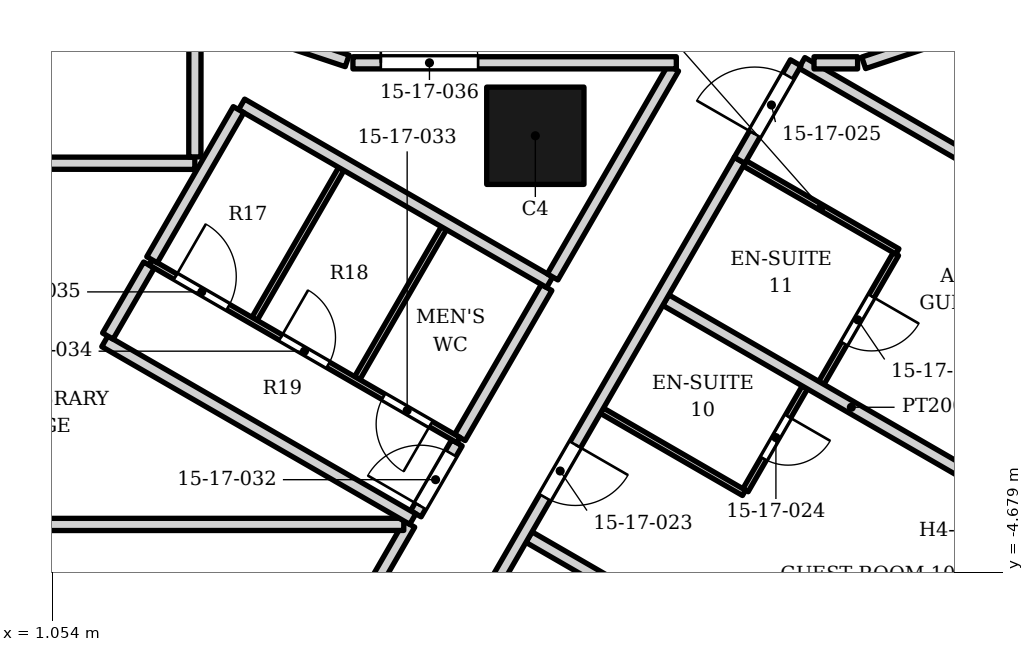
"""IFC4 building model, lengths in metres.
Left out: names, types, materials, properties, quantities, classifications, styles, units other than length and angle.
Written with IfcOpenShell. Run it as: python <this file> out.ifc"""

import sys

from ifc_helpers import new_model, si_unit, direction, frame, frame_2d, origin, origin_2d, place, context, subcontext, project, spatial, rectangle, extrude, element, fill, save


model = new_model("IFC4")
c1 = context("Model", 3, precision=1e-05, world=origin(), true_north=direction((0.0, 1.0)))
c2 = subcontext(c1, "Body", "Model", "MODEL_VIEW")
j1 = project(units=[si_unit("LENGTHUNIT", "METRE"), si_unit("PLANEANGLEUNIT", "RADIAN")], contexts=[c1])
p1 = place(None, origin())
s1 = spatial("IfcSite", under=j1, at=p1, CompositionType="ELEMENT")
p2 = place(p1, origin())
s2 = spatial("IfcBuilding", under=s1, at=p2, CompositionType="ELEMENT")
p3 = place(p2, frame((0.0, 0.0, 76.6)))
s3 = spatial("IfcBuildingStorey", under=s2, at=p3, CompositionType="ELEMENT", Elevation=76.6)
p4 = place(p3, frame((9.0, 2.5, 0.0), z_axis=(0.0, 0.0, 1.0), x_axis=(1.0, 0.0, 0.0)))
e1 = element("IfcColumn", 1, at=p4, inside=s3, PredefinedType="COLUMN", context=c2, shape_type="SweptSolid", body=[
    extrude(rectangle(XDim=1.6, YDim=1.6, at=origin_2d()), origin(), (0.0, 0.0, 1.0), 3.4),
])
p5 = place(p3, frame((15.464, -7.721, 0.0), z_axis=(0.0, 0.0, 1.0), x_axis=(0.500027713859, 0.866009402589, 0.0)))
e2 = element("IfcWall", 2, at=p5, inside=s3, PredefinedType="ELEMENTEDWALL", context=c2, shape_type="SweptSolid", body=[
    extrude(rectangle(XDim=4.2, YDim=0.2, at=frame_2d((2.1, 0.0))), origin(), (0.0, 0.0, 1.0), 2.384),
])
p6 = place(p5, frame((0.3, 0.0, 0.6)))
e3 = element("IfcOpeningElement", 3, at=p6, cuts=e2, PredefinedType="OPENING", context=c2, shape_type="SweptSolid", body=[
    extrude(rectangle(XDim=2.1, YDim=1.68, at=frame_2d((1.05, 0.84))), frame((0.0, 0.11, 0.0), z_axis=(0.0, -1.0, 0.0), x_axis=(1.0, 0.0, 0.0)), (0.0, 0.0, 1.0), 0.22),
])
p7 = place(p5, frame((2.7, 0.0, 0.0)))
e4 = element("IfcOpeningElement", 4, at=p7, cuts=e2, PredefinedType="OPENING", context=c2, shape_type="SweptSolid", body=[
    extrude(rectangle(XDim=1.2, YDim=2.28, at=frame_2d((0.6, 1.14))), frame((0.0, 0.11, 0.0), z_axis=(0.0, -1.0, 0.0), x_axis=(1.0, 0.0, 0.0)), (0.0, 0.0, 1.0), 0.22),
])
p8 = place(p3, frame((-0.029, -15.955, 0.0), z_axis=(0.0, 0.0, 1.0), x_axis=(0.499541892375, 0.866289730842, 0.0)))
e5 = element("IfcWall", 5, at=p8, inside=s3, PredefinedType="PARTITIONING", context=c2, shape_type="SweptSolid", body=[
    extrude(rectangle(XDim=13.93, YDim=0.2, at=frame_2d((6.965, 0.0))), origin(), (0.0, 0.0, 1.0), 2.242),
])
p9 = place(p8, frame((1.27, 0.0, 0.0)))
e6 = element("IfcOpeningElement", 6, at=p9, cuts=e5, PredefinedType="OPENING", context=c2, shape_type="SweptSolid", body=[
    extrude(rectangle(XDim=0.9, YDim=2.1, at=frame_2d((0.45, 1.05))), frame((0.0, 0.11, 0.0), z_axis=(0.0, -1.0, 0.0), x_axis=(1.0, 0.0, 0.0)), (0.0, 0.0, 1.0), 0.22),
])
p10 = place(p8, frame((8.235, 0.0, 0.0)))
e7 = element("IfcOpeningElement", 7, at=p10, cuts=e5, PredefinedType="OPENING", context=c2, shape_type="SweptSolid", body=[
    extrude(rectangle(XDim=0.9, YDim=2.1, at=frame_2d((0.45, 1.05))), frame((0.0, 0.11, 0.0), z_axis=(0.0, -1.0, 0.0), x_axis=(1.0, 0.0, 0.0)), (0.0, 0.0, 1.0), 0.22),
])
p11 = place(p3, frame((8.895, -4.1, 0.0), z_axis=(0.0, 0.0, 1.0), x_axis=(0.865906406618, -0.500206052519, 0.0)))
e8 = element("IfcWall", 8, at=p11, inside=s3, PredefinedType="PARTITIONING", context=c2, shape_type="SweptSolid", body=[
    extrude(rectangle(XDim=7.05, YDim=0.2, at=frame_2d((3.525, 0.0))), origin(), (0.0, 0.0, 1.0), 2.242),
])
p12 = place(p3, frame((-1.162, -3.893, 0.0), z_axis=(0.0, 0.0, 1.0), x_axis=(0.999999970181, 0.000244207691, 0.0)))
e9 = element("IfcWall", 9, at=p12, inside=s3, PredefinedType="PARTITIONING", context=c2, shape_type="SweptSolid", body=[
    extrude(rectangle(XDim=7.998, YDim=0.2, at=frame_2d((3.999, 0.0))), origin(), (0.0, 0.0, 1.0), 3.23),
])
p13 = place(p3, frame((7.035, -3.717, 0.0), z_axis=(0.0, 0.0, 1.0), x_axis=(0.50106482324, 0.865409754342, 0.0)))
e10 = element("IfcWall", 10, at=p13, inside=s3, PredefinedType="PARTITIONING", context=c2, shape_type="SweptSolid", body=[
    extrude(rectangle(XDim=1.348, YDim=0.2, at=frame_2d((0.674, 0.0))), origin(), (0.0, 0.0, 1.0), 2.242),
])
p14 = place(p13, frame((0.148, 0.0, 0.0)))
e11 = element("IfcOpeningElement", 11, at=p14, cuts=e10, PredefinedType="OPENING", context=c2, shape_type="SweptSolid", body=[
    extrude(rectangle(XDim=1.0, YDim=2.1, at=frame_2d((0.5, 1.05))), frame((0.0, 0.11, 0.0), z_axis=(0.0, -1.0, 0.0), x_axis=(1.0, 0.0, 0.0)), (0.0, 0.0, 1.0), 0.22),
])
p15 = place(p3, frame((12.457, -3.33, 0.0), z_axis=(0.0, 0.0, 1.0), x_axis=(0.49989585183, 0.866085525409, 0.0)))
e12 = element("IfcWall", 12, at=p15, inside=s3, PredefinedType="PARTITIONING", context=c2, shape_type="SweptSolid", body=[
    extrude(rectangle(XDim=1.95, YDim=0.1, at=frame_2d((0.975, 0.0))), origin(), (0.0, 0.0, 1.0), 2.242),
])
p16 = place(p15, frame((0.6, 0.0, 0.0)))
e13 = element("IfcOpeningElement", 13, at=p16, cuts=e12, PredefinedType="OPENING", context=c2, shape_type="SweptSolid", body=[
    extrude(rectangle(XDim=0.8, YDim=2.1, at=frame_2d((0.4, 1.05))), frame((0.0, 0.06, 0.0), z_axis=(0.0, -1.0, 0.0), x_axis=(1.0, 0.0, 0.0)), (0.0, 0.0, 1.0), 0.12),
])
p17 = place(p3, frame((7.759, -2.462, 0.0), z_axis=(0.0, 0.0, 1.0), x_axis=(0.500533044877, 0.865717431375, 0.0)))
e14 = element("IfcWall", 14, at=p17, inside=s3, PredefinedType="PARTITIONING", context=c2, shape_type="SweptSolid", body=[
    extrude(rectangle(XDim=2.85, YDim=0.2, at=frame_2d((1.425, 0.0))), origin(), (0.0, 0.0, 1.0), 2.473),
])
p18 = place(p3, frame((10.094, -2.021, 0.0), z_axis=(0.0, 0.0, 1.0), x_axis=(0.86571095196, -0.500544251447, 0.0)))
e15 = element("IfcWall", 15, at=p18, inside=s3, PredefinedType="PARTITIONING", context=c2, shape_type="SweptSolid", body=[
    extrude(rectangle(XDim=2.7, YDim=0.1, at=frame_2d((1.35, 0.0))), origin(), (0.0, 0.0, 1.0), 2.242),
])
p19 = place(p3, frame((13.704, -1.566, 0.0), z_axis=(0.0, 0.0, 1.0), x_axis=(0.500607988505, 0.865674096785, 0.0)))
e16 = element("IfcWall", 16, at=p19, inside=s3, PredefinedType="PARTITIONING", context=c2, shape_type="SweptSolid", body=[
    extrude(rectangle(XDim=2.45, YDim=0.1, at=frame_2d((1.225, 0.0))), origin(), (0.0, 0.0, 1.0), 2.242),
])
p20 = place(p19, frame((0.75, 0.0, 0.0)))
e17 = element("IfcOpeningElement", 17, at=p20, cuts=e16, PredefinedType="OPENING", context=c2, shape_type="SweptSolid", body=[
    extrude(rectangle(XDim=0.9, YDim=2.1, at=frame_2d((0.45, 1.05))), frame((0.0, 0.06, 0.0), z_axis=(0.0, -1.0, 0.0), x_axis=(1.0, 0.0, 0.0)), (0.0, 0.0, 1.0), 0.12),
])
p21 = place(p3, frame((6.071, -1.486, 0.0), z_axis=(0.0, 0.0, 1.0), x_axis=(0.500536077286, 0.865715678115, 0.0)))
e18 = element("IfcWall", 18, at=p21, inside=s3, PredefinedType="PARTITIONING", context=c2, shape_type="SweptSolid", body=[
    extrude(rectangle(XDim=2.848, YDim=0.1, at=frame_2d((1.424, 0.0))), origin(), (0.0, 0.0, 1.0), 2.242),
])
p22 = place(p3, frame((1.919, -0.881, 0.0), z_axis=(0.0, 0.0, 1.0), x_axis=(0.866167515178, -0.499753775024, 0.0)))
e19 = element("IfcWall", 19, at=p22, inside=s3, PredefinedType="PARTITIONING", context=c2, shape_type="SweptSolid", body=[
    extrude(rectangle(XDim=5.848, YDim=0.2, at=frame_2d((2.924, 0.0))), origin(), (0.0, 0.0, 1.0), 2.242),
])
p23 = place(p3, frame((4.382, -0.511, 0.0), z_axis=(0.0, 0.0, 1.0), x_axis=(0.500536077286, 0.865715678115, 0.0)))
e20 = element("IfcWall", 20, at=p23, inside=s3, PredefinedType="PARTITIONING", context=c2, shape_type="SweptSolid", body=[
    extrude(rectangle(XDim=2.848, YDim=0.1, at=frame_2d((1.424, 0.0))), origin(), (0.0, 0.0, 1.0), 2.242),
])
p24 = place(p3, frame((11.145, -0.202, 0.0), z_axis=(0.0, 0.0, 1.0), x_axis=(0.866031034943, -0.499990246421, 0.0)))
e21 = element("IfcWall", 21, at=p24, inside=s3, PredefinedType="PARTITIONING", context=c2, shape_type="SweptSolid", body=[
    extrude(rectangle(XDim=7.05, YDim=0.2, at=frame_2d((3.525, 0.0))), origin(), (0.0, 0.0, 1.0), 2.242),
])
p25 = place(p3, frame((4.169, 3.016, 0.0), z_axis=(0.0, 0.0, 1.0), x_axis=(0.866018092707, -0.500012662943, 0.0)))
e22 = element("IfcWall", 22, at=p25, inside=s3, PredefinedType="PARTITIONING", context=c2, shape_type="SweptSolid", body=[
    extrude(rectangle(XDim=5.85, YDim=0.2, at=frame_2d((2.925, 0.0))), origin(), (0.0, 0.0, 1.0), 2.242),
])
p26 = place(p3, frame((13.383, 3.699, 0.0), z_axis=(0.0, 0.0, 1.0), x_axis=(0.866028421525, -0.499994773084, 0.0)))
e23 = element("IfcWall", 23, at=p26, inside=s3, PredefinedType="PARTITIONING", context=c2, shape_type="SweptSolid", body=[
    extrude(rectangle(XDim=7.062, YDim=0.2, at=frame_2d((3.531, 0.0))), origin(), (0.0, 0.0, 1.0), 2.242),
])
p27 = place(p3, frame((1.969, -0.794, 0.0), z_axis=(0.0, 0.0, 1.0), x_axis=(0.501000622125, 0.865446923058, 0.0)))
e24 = element("IfcWall", 24, at=p27, inside=s3, PredefinedType="PARTITIONING", context=c2, shape_type="SweptSolid", body=[
    extrude(rectangle(XDim=1.35, YDim=0.2, at=frame_2d((0.675, 0.0))), origin(), (0.0, 0.0, 1.0), 2.242),
])
p28 = place(p3, frame((2.67, 0.42, 0.0), z_axis=(0.0, 0.0, 1.0), x_axis=(0.866025730634, -0.499999433879, 0.0)))
e25 = element("IfcWall", 25, at=p28, inside=s3, PredefinedType="PARTITIONING", context=c2, shape_type="SweptSolid", body=[
    extrude(rectangle(XDim=5.85, YDim=0.1, at=frame_2d((2.925, 0.0))), origin(), (0.0, 0.0, 1.0), 2.242),
])
p29 = place(p28, frame((4.425, 0.0, 0.0)))
e26 = element("IfcOpeningElement", 26, at=p29, cuts=e25, PredefinedType="OPENING", context=c2, shape_type="SweptSolid", body=[
    extrude(rectangle(XDim=0.9, YDim=2.1, at=frame_2d((0.45, 1.05))), frame((0.0, 0.06, 0.0), z_axis=(0.0, -1.0, 0.0), x_axis=(1.0, 0.0, 0.0)), (0.0, 0.0, 1.0), 0.12),
])
p30 = place(p28, frame((2.475, 0.0, 0.0)))
e27 = element("IfcOpeningElement", 27, at=p30, cuts=e25, PredefinedType="OPENING", context=c2, shape_type="SweptSolid", body=[
    extrude(rectangle(XDim=0.9, YDim=2.1, at=frame_2d((0.45, 1.05))), frame((0.0, 0.06, 0.0), z_axis=(0.0, -1.0, 0.0), x_axis=(1.0, 0.0, 0.0)), (0.0, 0.0, 1.0), 0.12),
])
p31 = place(p28, frame((0.475, 0.0, 0.0)))
e28 = element("IfcOpeningElement", 28, at=p31, cuts=e25, PredefinedType="OPENING", context=c2, shape_type="SweptSolid", body=[
    extrude(rectangle(XDim=1.0, YDim=2.1, at=frame_2d((0.5, 1.05))), frame((0.0, 0.06, 0.0), z_axis=(0.0, -1.0, 0.0), x_axis=(1.0, 0.0, 0.0)), (0.0, 0.0, 1.0), 0.12),
])
p32 = place(p3, frame((12.443, 2.046, 0.0), z_axis=(0.0, 0.0, 1.0), x_axis=(0.866329932158, -0.499472170042, 0.0)))
e29 = element("IfcWall", 29, at=p32, inside=s3, PredefinedType="PARTITIONING", context=c2, shape_type="SweptSolid", body=[
    extrude(rectangle(XDim=2.9, YDim=0.1, at=frame_2d((1.45, 0.0))), origin(), (0.0, 0.0, 1.0), 2.242),
])
p33 = place(p3, frame((-3.4, 2.052, 0.0), z_axis=(0.0, 0.0, 1.0), x_axis=(0.999999659082, -0.000825733904, 0.0)))
e30 = element("IfcWall", 30, at=p33, inside=s3, PredefinedType="PARTITIONING", context=c2, shape_type="SweptSolid", body=[
    extrude(rectangle(XDim=6.8, YDim=0.2, at=frame_2d((3.4, 0.0))), origin(), (0.0, 0.0, 1.0), 2.242),
])
p34 = place(p3, frame((0.859, -17.822, 0.0), z_axis=(0.0, 0.0, 1.0), x_axis=(0.500002395808, 0.866024020559, 0.0)))
e31 = element("IfcWall", 31, at=p34, inside=s3, PredefinedType="PARTITIONING", context=c2, shape_type="SweptSolid", body=[
    extrude(rectangle(XDim=23.0, YDim=0.2, at=frame_2d((11.5, 0.0))), origin(), (0.0, 0.0, 1.0), 2.242),
])
p35 = place(p34, frame((0.7, 0.0, 0.0)))
e32 = element("IfcOpeningElement", 32, at=p35, cuts=e31, PredefinedType="OPENING", context=c2, shape_type="SweptSolid", body=[
    extrude(rectangle(XDim=1.0, YDim=2.1, at=frame_2d((0.5, 1.05))), frame((0.0, 0.11, 0.0), z_axis=(0.0, -1.0, 0.0), x_axis=(1.0, 0.0, 0.0)), (0.0, 0.0, 1.0), 0.22),
])
p36 = place(p34, frame((3.1, 0.0, 0.0)))
e33 = element("IfcOpeningElement", 33, at=p36, cuts=e31, PredefinedType="OPENING", context=c2, shape_type="SweptSolid", body=[
    extrude(rectangle(XDim=1.0, YDim=2.1, at=frame_2d((0.5, 1.05))), frame((0.0, 0.11, 0.0), z_axis=(0.0, -1.0, 0.0), x_axis=(1.0, 0.0, 0.0)), (0.0, 0.0, 1.0), 0.22),
])
p37 = place(p34, frame((9.7, 0.0, 0.0)))
e34 = element("IfcOpeningElement", 34, at=p37, cuts=e31, PredefinedType="OPENING", context=c2, shape_type="SweptSolid", body=[
    extrude(rectangle(XDim=1.0, YDim=2.1, at=frame_2d((0.5, 1.05))), frame((0.0, 0.11, 0.0), z_axis=(0.0, -1.0, 0.0), x_axis=(1.0, 0.0, 0.0)), (0.0, 0.0, 1.0), 0.22),
])
p38 = place(p34, frame((12.1, 0.0, 0.0)))
e35 = element("IfcOpeningElement", 35, at=p38, cuts=e31, PredefinedType="OPENING", context=c2, shape_type="SweptSolid", body=[
    extrude(rectangle(XDim=1.0, YDim=2.1, at=frame_2d((0.5, 1.05))), frame((0.0, 0.11, 0.0), z_axis=(0.0, -1.0, 0.0), x_axis=(1.0, 0.0, 0.0)), (0.0, 0.0, 1.0), 0.22),
])
p39 = place(p34, frame((16.6, 0.0, 0.0)))
e36 = element("IfcOpeningElement", 36, at=p39, cuts=e31, PredefinedType="OPENING", context=c2, shape_type="SweptSolid", body=[
    extrude(rectangle(XDim=1.0, YDim=2.1, at=frame_2d((0.5, 1.05))), frame((0.0, 0.11, 0.0), z_axis=(0.0, -1.0, 0.0), x_axis=(1.0, 0.0, 0.0)), (0.0, 0.0, 1.0), 0.22),
])
p40 = place(p3, frame((3.4, 2.152, 0.0), z_axis=(0.0, 0.0, 1.0), x_axis=(0.000977397212, 0.999999522347, 0.0)))
e37 = element("IfcWall", 37, at=p40, inside=s3, PredefinedType="PARTITIONING", context=c2, shape_type="SweptSolid", body=[
    extrude(rectangle(XDim=1.998, YDim=0.2, at=frame_2d((0.999, 0.0))), origin(), (0.0, 0.0, 1.0), 3.23),
])
p41 = place(p3, frame((2.696, 0.461, 0.0), z_axis=(0.0, 0.0, 1.0), x_axis=(0.499502432077, 0.866312484239, 0.0)))
e38 = element("IfcWall", 38, at=p41, inside=s3, PredefinedType="PARTITIONING", context=c2, shape_type="SweptSolid", body=[
    extrude(rectangle(XDim=2.85, YDim=0.2, at=frame_2d((1.425, 0.0))), origin(), (0.0, 0.0, 1.0), 3.23),
])
p42 = place(p3, frame((9.284, 0.179, 0.0), z_axis=(0.0, 0.0, 1.0), x_axis=(0.500368865734, 0.865812334287, 0.0)))
e39 = element("IfcWall", 39, at=p42, inside=s3, PredefinedType="PARTITIONING", context=c2, shape_type="SweptSolid", body=[
    extrude(rectangle(XDim=3.966, YDim=0.2, at=frame_2d((1.983, 0.0))), origin(), (0.0, 0.0, 1.0), 2.242),
])
p43 = place(p3, frame((6.0, 3.7, 0.0), z_axis=(0.0, 0.0, 1.0), x_axis=(1.0, 0.0, 0.0)))
e40 = element("IfcWall", 40, at=p43, inside=s3, PredefinedType="PARTITIONING", context=c2, shape_type="SweptSolid", body=[
    extrude(rectangle(XDim=5.319, YDim=0.2, at=frame_2d((2.659, 0.0))), origin(), (0.0, 0.0, 1.0), 2.242),
])
p44 = place(p43, frame((0.459, 0.0, 0.0)))
e41 = element("IfcOpeningElement", 41, at=p44, cuts=e40, PredefinedType="OPENING", context=c2, shape_type="SweptSolid", body=[
    extrude(rectangle(XDim=1.6, YDim=2.1, at=frame_2d((0.8, 1.05))), frame((0.0, 0.11, 0.0), z_axis=(0.0, -1.0, 0.0), x_axis=(1.0, 0.0, 0.0)), (0.0, 0.0, 1.0), 0.22),
])
p45 = place(p3, frame((12.359, 2.097, 0.0), z_axis=(0.0, 0.0, 1.0), x_axis=(0.499120619587, 0.866532519357, 0.0)))
e42 = element("IfcWall", 42, at=p45, inside=s3, PredefinedType="PARTITIONING", context=c2, shape_type="SweptSolid", body=[
    extrude(rectangle(XDim=1.85, YDim=0.2, at=frame_2d((0.925, 0.0))), origin(), (0.0, 0.0, 1.0), 2.242),
])
p46 = place(p45, frame((0.5, 0.0, 0.0)))
e43 = element("IfcOpeningElement", 43, at=p46, cuts=e42, PredefinedType="OPENING", context=c2, shape_type="SweptSolid", body=[
    extrude(rectangle(XDim=1.1, YDim=2.1, at=frame_2d((0.55, 1.05))), frame((0.0, 0.11, 0.0), z_axis=(0.0, -1.0, 0.0), x_axis=(1.0, 0.0, 0.0)), (0.0, 0.0, 1.0), 0.22),
])
p47 = place(p3, frame((13.583, 3.699, 0.0), z_axis=(0.0, 0.0, 1.0), x_axis=(1.0, 0.0, 0.0)))
e44 = element("IfcWall", 44, at=p47, inside=s3, PredefinedType="PARTITIONING", context=c2, shape_type="SweptSolid", body=[
    extrude(rectangle(XDim=0.717, YDim=0.2, at=frame_2d((0.358, 0.0))), origin(), (0.0, 0.0, 1.0), 2.242),
])
p48 = place(p3, frame((14.4, 3.699, 0.0), z_axis=(0.0, 0.0, 1.0), x_axis=(0.948666237396, 0.316278943379, 0.0)))
e45 = element("IfcWall", 45, at=p48, inside=s3, PredefinedType="PARTITIONING", context=c2, shape_type="SweptSolid", body=[
    extrude(rectangle(XDim=1.431, YDim=0.2, at=frame_2d((0.716, 0.0))), origin(), (0.0, 0.0, 1.0), 2.384),
])
p49 = place(p3, frame((4.642, 4.152, 0.0), z_axis=(0.0, 0.0, 1.0), x_axis=(0.948683298051, -0.316227766017, 0.0)))
e46 = element("IfcWall", 46, at=p49, inside=s3, PredefinedType="PARTITIONING", context=c2, shape_type="SweptSolid", body=[
    extrude(rectangle(XDim=1.331, YDim=0.2, at=frame_2d((0.666, 0.0))), origin(), (0.0, 0.0, 1.0), 2.242),
])
p50 = place(p39, origin())
e47 = element("IfcDoor", 47, at=p50, inside=s3, OperationType="SINGLE_SWING_RIGHT", PredefinedType="DOOR", context=c2, shape_type="SweptSolid", body=[
    extrude(rectangle(XDim=1.0, YDim=2.1, at=frame_2d((0.5, 1.05))), frame((0.0, 0.025, 0.0), z_axis=(0.0, -1.0, 0.0), x_axis=(1.0, 0.0, 0.0)), (0.0, 0.0, 1.0), 0.05),
])
fill(e36, e47)
p51 = place(p16, origin())
e48 = element("IfcDoor", 48, at=p51, inside=s3, OperationType="SINGLE_SWING_RIGHT", PredefinedType="DOOR", context=c2, shape_type="SweptSolid", body=[
    extrude(rectangle(XDim=0.8, YDim=2.1, at=frame_2d((0.4, 1.05))), frame((0.0, 0.025, 0.0), z_axis=(0.0, -1.0, 0.0), x_axis=(1.0, 0.0, 0.0)), (0.0, 0.0, 1.0), 0.05),
])
fill(e13, e48)
p52 = place(p46, origin())
e49 = element("IfcDoor", 49, at=p52, inside=s3, OperationType="SINGLE_SWING_LEFT", PredefinedType="DOOR", context=c2, shape_type="SweptSolid", body=[
    extrude(rectangle(XDim=1.1, YDim=2.1, at=frame_2d((0.55, 1.05))), frame((0.0, 0.025, 0.0), z_axis=(0.0, -1.0, 0.0), x_axis=(1.0, 0.0, 0.0)), (0.0, 0.0, 1.0), 0.05),
])
fill(e43, e49)
p53 = place(p20, origin())
e50 = element("IfcDoor", 50, at=p53, inside=s3, OperationType="SINGLE_SWING_RIGHT", PredefinedType="DOOR", context=c2, shape_type="SweptSolid", body=[
    extrude(rectangle(XDim=0.9, YDim=2.1, at=frame_2d((0.45, 1.05))), frame((0.0, 0.025, 0.0), z_axis=(0.0, -1.0, 0.0), x_axis=(1.0, 0.0, 0.0)), (0.0, 0.0, 1.0), 0.05),
])
fill(e17, e50)
p54 = place(p14, origin())
e51 = element("IfcDoor", 51, at=p54, inside=s3, OperationType="SINGLE_SWING_LEFT", PredefinedType="DOOR", context=c2, shape_type="SweptSolid", body=[
    extrude(rectangle(XDim=1.0, YDim=2.1, at=frame_2d((0.5, 1.05))), frame((0.0, 0.025, 0.0), z_axis=(0.0, -1.0, 0.0), x_axis=(1.0, 0.0, 0.0)), (0.0, 0.0, 1.0), 0.05),
])
fill(e11, e51)
p55 = place(p29, origin())
e52 = element("IfcDoor", 52, at=p55, inside=s3, OperationType="SINGLE_SWING_RIGHT", PredefinedType="DOOR", context=c2, shape_type="SweptSolid", body=[
    extrude(rectangle(XDim=0.9, YDim=2.1, at=frame_2d((0.45, 1.05))), frame((0.0, 0.025, 0.0), z_axis=(0.0, -1.0, 0.0), x_axis=(1.0, 0.0, 0.0)), (0.0, 0.0, 1.0), 0.05),
])
fill(e26, e52)
p56 = place(p30, origin())
e53 = element("IfcDoor", 53, at=p56, inside=s3, OperationType="SINGLE_SWING_LEFT", PredefinedType="DOOR", context=c2, shape_type="SweptSolid", body=[
    extrude(rectangle(XDim=0.9, YDim=2.1, at=frame_2d((0.45, 1.05))), frame((0.0, 0.025, 0.0), z_axis=(0.0, -1.0, 0.0), x_axis=(1.0, 0.0, 0.0)), (0.0, 0.0, 1.0), 0.05),
])
fill(e27, e53)
p57 = place(p31, origin())
e54 = element("IfcDoor", 54, at=p57, inside=s3, OperationType="SINGLE_SWING_LEFT", PredefinedType="DOOR", context=c2, shape_type="SweptSolid", body=[
    extrude(rectangle(XDim=1.0, YDim=2.1, at=frame_2d((0.5, 1.05))), frame((0.0, 0.025, 0.0), z_axis=(0.0, -1.0, 0.0), x_axis=(1.0, 0.0, 0.0)), (0.0, 0.0, 1.0), 0.05),
])
fill(e28, e54)
p58 = place(p44, origin())
e55 = element("IfcDoor", 55, at=p58, inside=s3, OperationType="DOUBLE_DOOR_SINGLE_SWING", PredefinedType="DOOR", context=c2, shape_type="SweptSolid", body=[
    extrude(rectangle(XDim=1.6, YDim=2.1, at=frame_2d((0.8, 1.05))), frame((0.0, 0.025, 0.0), z_axis=(0.0, -1.0, 0.0), x_axis=(1.0, 0.0, 0.0)), (0.0, 0.0, 1.0), 0.05),
])
fill(e41, e55)
save(model, sys.argv[1])
